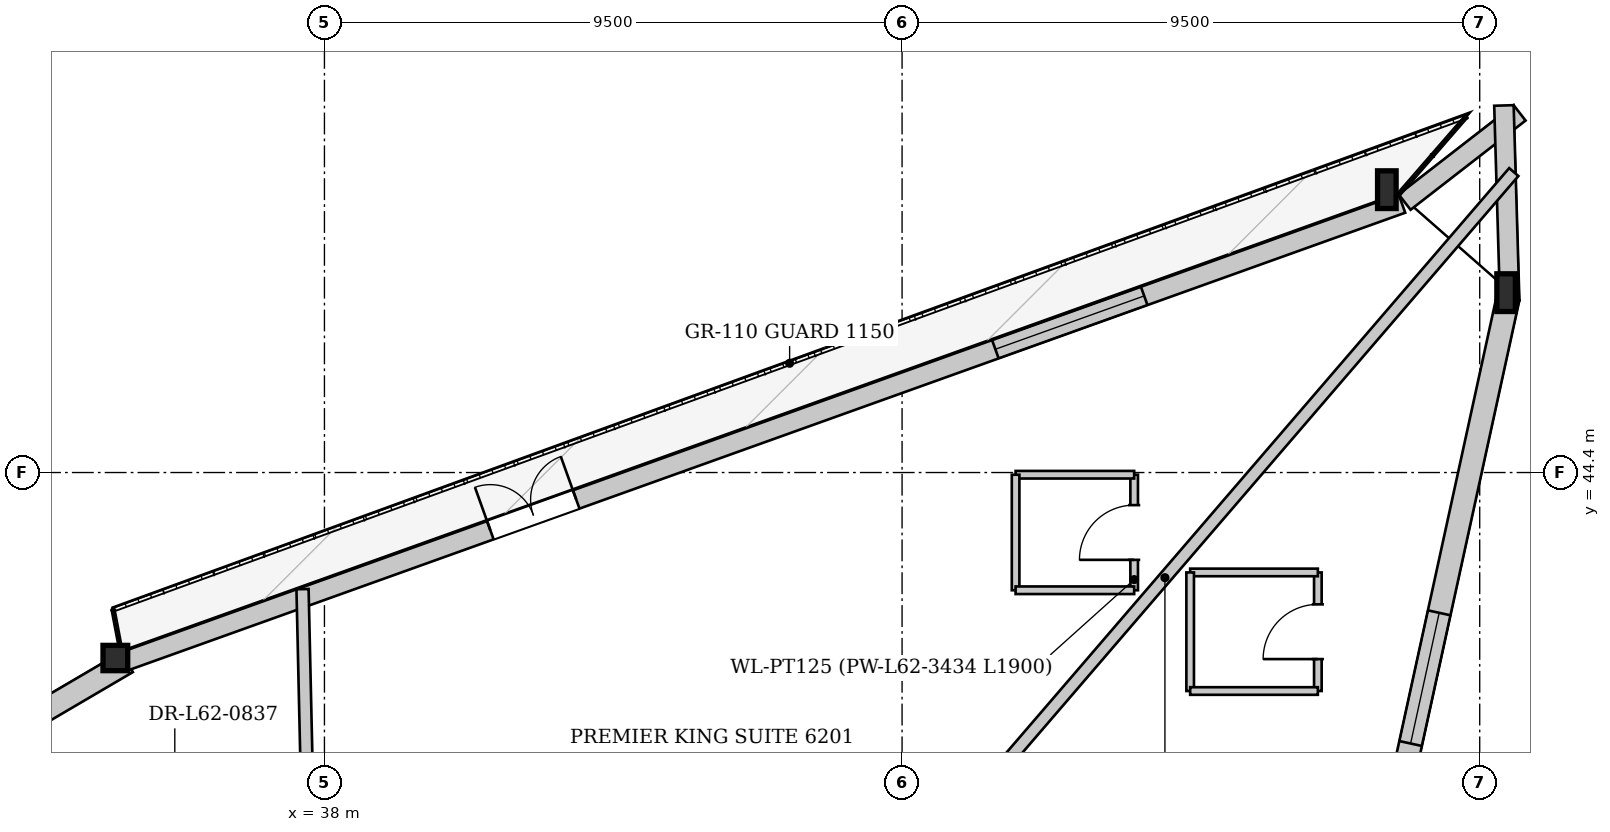
"""IFC4 building model, lengths in metres.
Left out: names, types, materials, properties, quantities, classifications, styles, units other than length and angle.
Written with IfcOpenShell. Run it as: python <this file> out.ifc"""

import sys

from ifc_helpers import new_model, si_unit, direction, frame, frame_2d, origin, origin_2d, place, context, subcontext, project, spatial, rectangle, i_section, extrude, source, transform, mapped, element, fill, save


model = new_model("IFC4")
c1 = context("Model", 3, precision=1e-05, world=origin(), true_north=direction((0.0, 1.0)))
c2 = subcontext(c1, "Body", "Model", "MODEL_VIEW")
j1 = project(units=[si_unit("LENGTHUNIT", "METRE"), si_unit("PLANEANGLEUNIT", "RADIAN")], contexts=[c1])
p1 = place(None, origin())
s1 = spatial("IfcSite", under=j1, at=p1, CompositionType="ELEMENT")
p2 = place(p1, origin())
s2 = spatial("IfcBuilding", under=s1, at=p2, CompositionType="ELEMENT")
p3 = place(p2, frame((0.0, 0.0, 234.5)))
s3 = spatial("IfcBuildingStorey", under=s2, at=p3, CompositionType="ELEMENT", Elevation=234.5)
m1 = source(origin(), c2, "Body", "SweptSolid", [
    extrude(i_section(OverallWidth=0.305, OverallDepth=0.62, WebThickness=0.021, FlangeThickness=0.04, at=origin_2d()), origin(), (0.0, 0.0, 1.0), 3.472),
])
p4 = place(p3, frame((57.653, 47.233, 0.0), z_axis=(-0.125805703613, 0.072150168757, 0.989427752838), x_axis=(-0.497496020718, -0.867466258347, 0.0)))
e1 = element("IfcColumn", 1, at=p4, inside=s3, PredefinedType="COLUMN", context=c2, shape_type="MappedRepresentation", body=[
    mapped(m1, transform((0.0, 0.0, 0.0), x_axis=(1.0, 0.0, 0.0), y_axis=(0.0, 1.0, 0.0), z_axis=(0.0, 0.0, 1.0), scale=1.0)),
])
m2 = source(origin(), c2, "Body", "SweptSolid", [
    extrude(i_section(OverallWidth=0.305, OverallDepth=0.62, WebThickness=0.021, FlangeThickness=0.04, at=origin_2d()), origin(), (0.0, 0.0, 1.0), 3.46),
])
p5 = place(p3, frame((55.667, 48.974, 0.0), z_axis=(-0.112317530713, 0.044941122528, 0.992655563527), x_axis=(-0.371491223958, -0.928436465528, 0.0)))
e2 = element("IfcColumn", 2, at=p5, inside=s3, PredefinedType="COLUMN", context=c2, shape_type="MappedRepresentation", body=[
    mapped(m2, transform((0.0, 0.0, 0.0), x_axis=(1.0, 0.0, 0.0), y_axis=(0.0, 1.0, 0.0), z_axis=(0.0, 0.0, 1.0), scale=1.0)),
])
m3 = source(origin(), c2, "Body", "SweptSolid", [
    extrude(i_section(OverallWidth=0.406, OverallDepth=0.416, WebThickness=0.027, FlangeThickness=0.042, at=origin_2d()), origin(), (0.0, 0.0, 1.0), 3.446),
])
p6 = place(p3, frame((34.657, 41.446, 0.0), z_axis=(-0.055618943406, -0.055831499877, 0.996889851867), x_axis=(0.708454075285, -0.7057569151, 0.0)))
e3 = element("IfcColumn", 3, at=p6, inside=s3, PredefinedType="COLUMN", context=c2, shape_type="MappedRepresentation", body=[
    mapped(m3, transform((0.0, 0.0, 0.0), x_axis=(1.0, 0.0, 0.0), y_axis=(0.0, 1.0, 0.0), z_axis=(0.0, 0.0, 1.0), scale=1.0)),
])
p7 = place(p3, frame((15.502, 29.99, 0.0), z_axis=(0.0, 0.0, 1.0), x_axis=(0.862571881981, 0.505934529772, 0.0)))
e4 = element("IfcWall", 4, at=p7, inside=s3, PredefinedType="SOLIDWALL", context=c2, shape_type="SweptSolid", body=[
    extrude(rectangle(XDim=22.318, YDim=0.38, at=frame_2d((11.159, 0.0))), origin(), (0.0, 0.0, 1.0), 2.872),
])
p8 = place(p7, frame((5.149, 0.0, 0.502)))
e5 = element("IfcOpeningElement", 5, at=p8, cuts=e4, PredefinedType="OPENING", context=c2, shape_type="SweptSolid", body=[
    extrude(rectangle(XDim=2.2, YDim=2.25, at=frame_2d((1.1, 1.125))), frame((0.0, 0.2, 0.0), z_axis=(0.0, -1.0, 0.0), x_axis=(1.0, 0.0, 0.0)), (0.0, 0.0, 1.0), 0.4),
])
p9 = place(p7, frame((15.419, 0.0, 0.502)))
e6 = element("IfcOpeningElement", 6, at=p9, cuts=e4, PredefinedType="OPENING", context=c2, shape_type="SweptSolid", body=[
    extrude(rectangle(XDim=2.2, YDim=2.25, at=frame_2d((1.1, 1.125))), frame((0.0, 0.2, 0.0), z_axis=(0.0, -1.0, 0.0), x_axis=(1.0, 0.0, 0.0)), (0.0, 0.0, 1.0), 0.4),
])
p10 = place(p3, frame((34.711, 41.295, 0.0), z_axis=(0.0, 0.0, 1.0), x_axis=(0.941393680714, 0.337309854455, 0.0)))
e7 = element("IfcWall", 7, at=p10, inside=s3, PredefinedType="SOLIDWALL", context=c2, shape_type="SweptSolid", body=[
    extrude(rectangle(XDim=22.318, YDim=0.32, at=frame_2d((11.159, 0.0))), origin(), (0.0, 0.0, 1.0), 2.872),
])
p11 = place(p10, frame((6.392, 0.0, 0.0)))
e8 = element("IfcOpeningElement", 8, at=p11, cuts=e7, PredefinedType="OPENING", context=c2, shape_type="SweptSolid", body=[
    extrude(rectangle(XDim=1.5, YDim=2.3, at=frame_2d((0.75, 1.15))), frame((0.0, 0.17, 0.0), z_axis=(0.0, -1.0, 0.0), x_axis=(1.0, 0.0, 0.0)), (0.0, 0.0, 1.0), 0.34),
])
p12 = place(p10, frame((15.215, 0.0, 0.402)))
e9 = element("IfcOpeningElement", 9, at=p12, cuts=e7, PredefinedType="OPENING", context=c2, shape_type="SweptSolid", body=[
    extrude(rectangle(XDim=2.6, YDim=2.35, at=frame_2d((1.3, 1.175))), frame((0.0, 0.17, 0.0), z_axis=(0.0, -1.0, 0.0), x_axis=(1.0, 0.0, 0.0)), (0.0, 0.0, 1.0), 0.34),
])
p13 = place(p3, frame((55.765, 48.847, 0.0), z_axis=(0.0, 0.0, 1.0), x_axis=(0.790076637558, 0.613008080522, 0.0)))
e10 = element("IfcWall", 10, at=p13, inside=s3, PredefinedType="SOLIDWALL", context=c2, shape_type="SweptSolid", body=[
    extrude(rectangle(XDim=2.394, YDim=0.32, at=frame_2d((1.197, 0.0))), origin(), (0.0, 0.0, 1.0), 2.872),
])
p14 = place(p3, frame((57.398, 50.437, 0.0), z_axis=(0.0, 0.0, 1.0), x_axis=(0.029434813094, -0.999566702015, 0.0)))
e11 = element("IfcWall", 11, at=p14, inside=s3, PredefinedType="SOLIDWALL", context=c2, shape_type="SweptSolid", body=[
    extrude(rectangle(XDim=3.21, YDim=0.32, at=frame_2d((1.605, 0.0))), origin(), (0.0, 0.0, 1.0), 2.872),
])
p15 = place(p3, frame((57.467, 47.273, 0.0), z_axis=(0.0, 0.0, 1.0), x_axis=(-0.213695286904, -0.976900365623, 0.0)))
e12 = element("IfcWall", 12, at=p15, inside=s3, PredefinedType="SOLIDWALL", context=c2, shape_type="SweptSolid", body=[
    extrude(rectangle(XDim=22.869, YDim=0.38, at=frame_2d((11.435, 0.0))), origin(), (0.0, 0.0, 1.0), 2.872),
])
p16 = place(p15, frame((5.303, 0.0, 0.502)))
e13 = element("IfcOpeningElement", 13, at=p16, cuts=e12, PredefinedType="OPENING", context=c2, shape_type="SweptSolid", body=[
    extrude(rectangle(XDim=2.2, YDim=2.25, at=frame_2d((1.1, 1.125))), frame((0.0, 0.2, 0.0), z_axis=(0.0, -1.0, 0.0), x_axis=(1.0, 0.0, 0.0)), (0.0, 0.0, 1.0), 0.4),
])
p17 = place(p15, frame((13.766, 0.0, 0.502)))
e14 = element("IfcOpeningElement", 14, at=p17, cuts=e12, PredefinedType="OPENING", context=c2, shape_type="SweptSolid", body=[
    extrude(rectangle(XDim=2.2, YDim=2.25, at=frame_2d((1.1, 1.125))), frame((0.0, 0.2, 0.0), z_axis=(0.0, -1.0, 0.0), x_axis=(1.0, 0.0, 0.0)), (0.0, 0.0, 1.0), 0.4),
])
p18 = place(p3, frame((46.085, 36.0, 0.0), z_axis=(0.0, 0.0, 1.0), x_axis=(0.652105460698, 0.758128266277, 0.0)))
e15 = element("IfcWall", 15, at=p18, inside=s3, PredefinedType="PARTITIONING", context=c2, shape_type="SweptSolid", body=[
    extrude(rectangle(XDim=17.597, YDim=0.2, at=frame_2d((8.799, 0.0))), origin(), (0.0, 0.0, 1.0), 2.975),
])
p19 = place(p3, frame((37.787, 36.0, 0.0), z_axis=(0.0, 0.0, 1.0), x_axis=(-0.022666666655, 0.999743078107, 0.0)))
e16 = element("IfcWall", 16, at=p19, inside=s3, PredefinedType="PARTITIONING", context=c2, shape_type="SweptSolid", body=[
    extrude(rectangle(XDim=6.484, YDim=0.2, at=frame_2d((3.242, 0.0))), origin(), (0.0, 0.0, 1.0), 3.38),
])
p20 = place(p3, frame((51.317, 42.464, 0.0), z_axis=(0.0, 0.0, 1.0), x_axis=(0.0, 1.0, 0.0)))
e17 = element("IfcWall", 17, at=p20, inside=s3, PredefinedType="PARTITIONING", context=c2, shape_type="SweptSolid", body=[
    extrude(rectangle(XDim=1.9, YDim=0.125, at=frame_2d((0.95, 0.0))), origin(), (0.0, 0.0, 1.0), 3.38),
])
p21 = place(p20, frame((0.5, 0.0, 0.0)))
e18 = element("IfcOpeningElement", 18, at=p21, cuts=e17, PredefinedType="OPENING", context=c2, shape_type="SweptSolid", body=[
    extrude(rectangle(XDim=0.9, YDim=2.1, at=frame_2d((0.45, 1.05))), frame((0.0, 0.073, 0.0), z_axis=(0.0, -1.0, 0.0), x_axis=(1.0, 0.0, 0.0)), (0.0, 0.0, 1.0), 0.145),
])
p22 = place(p3, frame((51.317, 44.364, 0.0), z_axis=(0.0, 0.0, 1.0), x_axis=(-1.0, 0.0, 0.0)))
e19 = element("IfcWall", 19, at=p22, inside=s3, PredefinedType="PARTITIONING", context=c2, shape_type="SweptSolid", body=[
    extrude(rectangle(XDim=1.95, YDim=0.125, at=frame_2d((0.975, 0.0))), origin(), (0.0, 0.0, 1.0), 3.38),
])
p23 = place(p3, frame((49.367, 44.364, 0.0), z_axis=(0.0, 0.0, 1.0), x_axis=(0.0, -1.0, 0.0)))
e20 = element("IfcWall", 20, at=p23, inside=s3, PredefinedType="PARTITIONING", context=c2, shape_type="SweptSolid", body=[
    extrude(rectangle(XDim=1.9, YDim=0.125, at=frame_2d((0.95, 0.0))), origin(), (0.0, 0.0, 1.0), 3.38),
])
p24 = place(p3, frame((49.367, 42.464, 0.0), z_axis=(0.0, 0.0, 1.0), x_axis=(1.0, 0.0, 0.0)))
e21 = element("IfcWall", 21, at=p24, inside=s3, PredefinedType="PARTITIONING", context=c2, shape_type="SweptSolid", body=[
    extrude(rectangle(XDim=1.95, YDim=0.125, at=frame_2d((0.975, 0.0))), origin(), (0.0, 0.0, 1.0), 3.125),
])
p25 = place(p3, frame((54.338, 40.807, 0.0), z_axis=(0.0, 0.0, 1.0), x_axis=(0.0, 1.0, 0.0)))
e22 = element("IfcWall", 22, at=p25, inside=s3, PredefinedType="PARTITIONING", context=c2, shape_type="SweptSolid", body=[
    extrude(rectangle(XDim=1.95, YDim=0.125, at=frame_2d((0.975, 0.0))), origin(), (0.0, 0.0, 1.0), 3.38),
])
p26 = place(p25, frame((0.525, 0.0, 0.0)))
e23 = element("IfcOpeningElement", 23, at=p26, cuts=e22, PredefinedType="OPENING", context=c2, shape_type="SweptSolid", body=[
    extrude(rectangle(XDim=0.9, YDim=2.1, at=frame_2d((0.45, 1.05))), frame((0.0, 0.073, 0.0), z_axis=(0.0, -1.0, 0.0), x_axis=(1.0, 0.0, 0.0)), (0.0, 0.0, 1.0), 0.145),
])
p27 = place(p3, frame((54.338, 42.757, 0.0), z_axis=(0.0, 0.0, 1.0), x_axis=(-1.0, 0.0, 0.0)))
e24 = element("IfcWall", 24, at=p27, inside=s3, PredefinedType="PARTITIONING", context=c2, shape_type="SweptSolid", body=[
    extrude(rectangle(XDim=2.1, YDim=0.125, at=frame_2d((1.05, 0.0))), origin(), (0.0, 0.0, 1.0), 3.38),
])
p28 = place(p3, frame((52.238, 42.757, 0.0), z_axis=(0.0, 0.0, 1.0), x_axis=(0.0, -1.0, 0.0)))
e25 = element("IfcWall", 25, at=p28, inside=s3, PredefinedType="PARTITIONING", context=c2, shape_type="SweptSolid", body=[
    extrude(rectangle(XDim=1.95, YDim=0.125, at=frame_2d((0.975, 0.0))), origin(), (0.0, 0.0, 1.0), 3.38),
])
p29 = place(p3, frame((52.238, 40.807, 0.0), z_axis=(0.0, 0.0, 1.0), x_axis=(1.0, 0.0, 0.0)))
e26 = element("IfcWall", 26, at=p29, inside=s3, PredefinedType="PARTITIONING", context=c2, shape_type="SweptSolid", body=[
    extrude(rectangle(XDim=2.1, YDim=0.125, at=frame_2d((1.05, 0.0))), origin(), (0.0, 0.0, 1.0), 3.38),
])
m4 = source(origin(), c2, "Body", "SweptSolid", [
    extrude(rectangle(XDim=1.5, YDim=2.3, at=frame_2d((0.75, 1.15))), frame((0.0, 0.025, 0.0), z_axis=(0.0, -1.0, 0.0), x_axis=(1.0, 0.0, 0.0)), (0.0, 0.0, 1.0), 0.05),
])
p30 = place(p11, origin())
e27 = element("IfcDoor", 27, at=p30, inside=s3, OperationType="DOUBLE_DOOR_SINGLE_SWING", PredefinedType="DOOR", context=c2, shape_type="MappedRepresentation", body=[
    mapped(m4, transform((0.0, 0.0, 0.0), x_axis=(1.0, 0.0, 0.0), y_axis=(0.0, 1.0, 0.0), z_axis=(0.0, 0.0, 1.0), scale=1.0)),
])
fill(e8, e27)
m5 = source(origin(), c2, "Body", "SweptSolid", [
    extrude(rectangle(XDim=2.6, YDim=2.35, at=frame_2d((1.3, 1.175))), frame((0.0, 0.03, 0.0), z_axis=(0.0, -1.0, 0.0), x_axis=(1.0, 0.0, 0.0)), (0.0, 0.0, 1.0), 0.06),
])
p31 = place(p12, origin())
e28 = element("IfcWindow", 28, at=p31, inside=s3, PartitioningType="SINGLE_PANEL", PredefinedType="WINDOW", context=c2, shape_type="MappedRepresentation", body=[
    mapped(m5, transform((0.0, 0.0, 0.0), x_axis=(1.0, 0.0, 0.0), y_axis=(0.0, 1.0, 0.0), z_axis=(0.0, 0.0, 1.0), scale=1.0)),
])
fill(e9, e28)
m6 = source(origin(), c2, "Body", "SweptSolid", [
    extrude(rectangle(XDim=2.2, YDim=2.25, at=frame_2d((1.1, 1.125))), frame((0.0, 0.03, 0.0), z_axis=(0.0, -1.0, 0.0), x_axis=(1.0, 0.0, 0.0)), (0.0, 0.0, 1.0), 0.06),
])
p32 = place(p16, origin())
e29 = element("IfcWindow", 29, at=p32, inside=s3, PartitioningType="SINGLE_PANEL", PredefinedType="WINDOW", context=c2, shape_type="MappedRepresentation", body=[
    mapped(m6, transform((0.0, 0.0, 0.0), x_axis=(1.0, 0.0, 0.0), y_axis=(0.0, 1.0, 0.0), z_axis=(0.0, 0.0, 1.0), scale=1.0)),
])
fill(e13, e29)
m7 = source(origin(), c2, "Body", "SweptSolid", [
    extrude(rectangle(XDim=0.9, YDim=2.1, at=frame_2d((0.45, 1.05))), frame((0.0, 0.025, 0.0), z_axis=(0.0, -1.0, 0.0), x_axis=(1.0, 0.0, 0.0)), (0.0, 0.0, 1.0), 0.05),
])
p33 = place(p21, origin())
e30 = element("IfcDoor", 30, at=p33, inside=s3, OperationType="SINGLE_SWING_LEFT", PredefinedType="DOOR", context=c2, shape_type="MappedRepresentation", body=[
    mapped(m7, transform((0.0, 0.0, 0.0), x_axis=(1.0, 0.0, 0.0), y_axis=(0.0, 1.0, 0.0), z_axis=(0.0, 0.0, 1.0), scale=1.0)),
])
fill(e18, e30)
p34 = place(p26, origin())
e31 = element("IfcDoor", 31, at=p34, inside=s3, OperationType="SINGLE_SWING_LEFT", PredefinedType="DOOR", context=c2, shape_type="MappedRepresentation", body=[
    mapped(m7, transform((0.0, 0.0, 0.0), x_axis=(1.0, 0.0, 0.0), y_axis=(0.0, 1.0, 0.0), z_axis=(0.0, 0.0, 1.0), scale=1.0)),
])
fill(e23, e31)
save(model, sys.argv[1])
